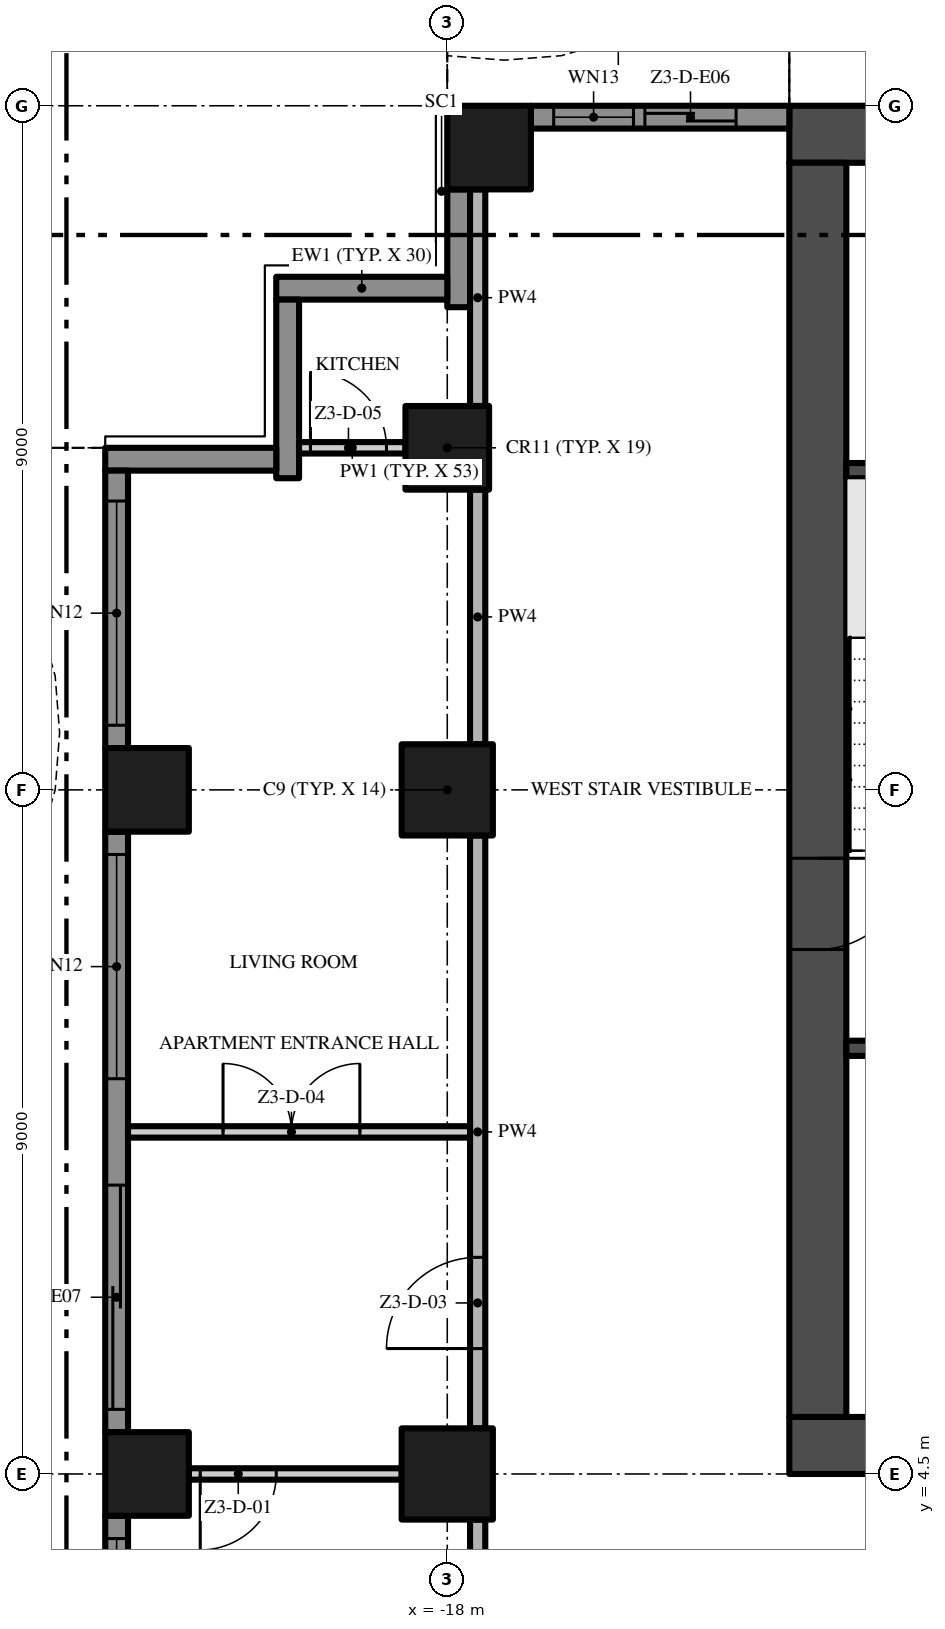
"""IFC4 building model, lengths in metres.
Left out: names, types, materials, properties, quantities, classifications, styles, units other than length and angle.
Written with IfcOpenShell. Run it as: python <this file> out.ifc"""

import sys

from ifc_helpers import new_model, si_unit, direction, frame, frame_2d, origin, origin_2d, place, context, subcontext, project, spatial, polyline, rectangle, outline, extrude, element, fill, save


model = new_model("IFC4")
c1 = context("Model", 3, precision=1e-05, world=origin(), true_north=direction((0.0, 1.0)))
c2 = subcontext(c1, "Body", "Model", "MODEL_VIEW")
j1 = project(units=[si_unit("LENGTHUNIT", "METRE"), si_unit("PLANEANGLEUNIT", "RADIAN")], contexts=[c1])
p1 = place(None, origin())
s1 = spatial("IfcSite", under=j1, at=p1, CompositionType="ELEMENT")
p2 = place(p1, origin())
s2 = spatial("IfcBuilding", under=s1, at=p2, CompositionType="ELEMENT")
p3 = place(p2, frame((0.0, 0.0, 159.2)))
s3 = spatial("IfcBuildingStorey", under=s2, at=p3, CompositionType="ELEMENT", Elevation=159.2)
p4 = place(p3, frame((-13.5, 4.875, -0.3), z_axis=(0.0, 0.0, 1.0), x_axis=(1.0, 0.0, 0.0)))
e1 = element("IfcWall", 1, at=p4, inside=s3, PredefinedType="SHEAR", context=c2, shape_type="SweptSolid", body=[
    extrude(rectangle(XDim=27.0, YDim=0.75, at=frame_2d((13.5, 0.0))), origin(), (0.0, 0.0, 1.0), 3.8),
])
p5 = place(p4, frame((12.0, 0.0, 0.3)))
e2 = element("IfcOpeningElement", 2, at=p5, cuts=e1, PredefinedType="OPENING", context=c2, shape_type="SweptSolid", body=[
    extrude(rectangle(XDim=3.0, YDim=2.4, at=frame_2d((1.5, 1.2))), frame((0.0, 0.385, 0.0), z_axis=(0.0, -1.0, 0.0), x_axis=(1.0, 0.0, 0.0)), (0.0, 0.0, 1.0), 0.77),
])
p6 = place(p4, frame((4.9, 0.0, 0.3)))
e3 = element("IfcOpeningElement", 3, at=p6, cuts=e1, PredefinedType="OPENING", context=c2, shape_type="SweptSolid", body=[
    extrude(rectangle(XDim=1.2, YDim=2.2, at=frame_2d((0.6, 1.1))), frame((0.0, 0.385, 0.0), z_axis=(0.0, -1.0, 0.0), x_axis=(1.0, 0.0, 0.0)), (0.0, 0.0, 1.0), 0.77),
])
p7 = place(p4, frame((20.75, 0.0, 0.3)))
e4 = element("IfcOpeningElement", 4, at=p7, cuts=e1, PredefinedType="OPENING", context=c2, shape_type="SweptSolid", body=[
    extrude(rectangle(XDim=1.5, YDim=2.2, at=frame_2d((0.75, 1.1))), frame((0.0, 0.385, 0.0), z_axis=(0.0, -1.0, 0.0), x_axis=(1.0, 0.0, 0.0)), (0.0, 0.0, 1.0), 0.77),
])
p8 = place(p4, frame((17.4, 0.0, 0.3)))
e5 = element("IfcOpeningElement", 5, at=p8, cuts=e1, PredefinedType="OPENING", context=c2, shape_type="SweptSolid", body=[
    extrude(rectangle(XDim=1.2, YDim=2.2, at=frame_2d((0.6, 1.1))), frame((0.0, 0.385, 0.0), z_axis=(0.0, -1.0, 0.0), x_axis=(1.0, 0.0, 0.0)), (0.0, 0.0, 1.0), 0.77),
])
p9 = place(p3, frame((13.5, 22.125, -0.3), z_axis=(0.0, 0.0, 1.0), x_axis=(-1.0, 0.0, 0.0)))
e6 = element("IfcWall", 6, at=p9, inside=s3, PredefinedType="SHEAR", context=c2, shape_type="SweptSolid", body=[
    extrude(rectangle(XDim=27.0, YDim=0.75, at=frame_2d((13.5, 0.0))), origin(), (0.0, 0.0, 1.0), 3.8),
])
p10 = place(p3, frame((-13.125, 21.75, -0.3), z_axis=(0.0, 0.0, 1.0), x_axis=(0.0, -1.0, 0.0)))
e7 = element("IfcWall", 7, at=p10, inside=s3, PredefinedType="SHEAR", context=c2, shape_type="SweptSolid", body=[
    extrude(rectangle(XDim=16.5, YDim=0.75, at=frame_2d((8.25, 0.0))), origin(), (0.0, 0.0, 1.0), 3.8),
])
p11 = place(p10, frame((9.15, 0.0, 0.3)))
e8 = element("IfcOpeningElement", 8, at=p11, cuts=e7, PredefinedType="OPENING", context=c2, shape_type="SweptSolid", body=[
    extrude(rectangle(XDim=1.2, YDim=2.2, at=frame_2d((0.6, 1.1))), frame((0.0, 0.385, 0.0), z_axis=(0.0, -1.0, 0.0), x_axis=(1.0, 0.0, 0.0)), (0.0, 0.0, 1.0), 0.77),
])
p12 = place(p3, frame((-18.0, 13.5, 0.0), z_axis=(0.0, 0.0, 1.0), x_axis=(1.0, 0.0, 0.0)))
e9 = element("IfcColumn", 9, at=p12, inside=s3, PredefinedType="COLUMN", context=c2, shape_type="SweptSolid", body=[
    extrude(rectangle(XDim=1.2, YDim=1.2, at=origin_2d()), origin(), (0.0, 0.0, 1.0), 3.5),
])
p13 = place(p3, frame((-17.45, 21.95, 0.0), z_axis=(0.0, 0.0, 1.0), x_axis=(1.0, 0.0, 0.0)))
e10 = element("IfcColumn", 10, at=p13, inside=s3, PredefinedType="COLUMN", context=c2, shape_type="SweptSolid", body=[
    extrude(rectangle(XDim=1.1, YDim=1.1, at=origin_2d()), origin(), (0.0, 0.0, 1.0), 3.5),
])
p14 = place(p3, frame((-18.0, 4.5, 0.0), z_axis=(0.0, 0.0, 1.0), x_axis=(1.0, 0.0, 0.0)))
e11 = element("IfcColumn", 11, at=p14, inside=s3, PredefinedType="COLUMN", context=c2, shape_type="SweptSolid", body=[
    extrude(rectangle(XDim=1.2, YDim=1.2, at=origin_2d()), origin(), (0.0, 0.0, 1.0), 3.5),
])
for number, where, z_axis, x_axis in (
    (12, (-21.95, 13.5, 0.0), (0.0, 0.0, 1.0), (1.0, 0.0, 0.0)),
    (13, (-18.0, 18.0, 0.0), (0.0, 0.0, 1.0), (1.0, 0.0, 0.0)),
    (14, (-21.95, 4.5, 0.0), (0.0, 0.0, 1.0), (1.0, 0.0, 0.0)),
):
    element("IfcColumn", number, at=place(p3, frame(where, z_axis=z_axis, x_axis=x_axis)), inside=s3, PredefinedType="COLUMN", context=c2, shape_type="SweptSolid", body=[
        extrude(rectangle(XDim=1.1, YDim=1.1, at=origin_2d()), origin(), (0.0, 0.0, 1.0), 3.5),
    ])
p15 = place(p3, frame((-16.9, 22.35, 0.0), z_axis=(0.0, 0.0, 1.0), x_axis=(1.0, 0.0, 0.0)))
e15 = element("IfcWall", 15, at=p15, inside=s3, PredefinedType="SOLIDWALL", context=c2, shape_type="SweptSolid", body=[
    extrude(rectangle(XDim=3.4, YDim=0.3, at=frame_2d((1.7, 0.0))), origin(), (0.0, 0.0, 1.0), 3.5),
])
p16 = place(p15, frame((1.5, 0.0, 0.0)))
e16 = element("IfcOpeningElement", 16, at=p16, cuts=e15, PredefinedType="OPENING", context=c2, shape_type="SweptSolid", body=[
    extrude(rectangle(XDim=1.2, YDim=2.4, at=frame_2d((0.6, 1.2))), frame((0.0, 0.16, 0.0), z_axis=(0.0, -1.0, 0.0), x_axis=(1.0, 0.0, 0.0)), (0.0, 0.0, 1.0), 0.32),
])
p17 = place(p15, frame((0.3, 0.0, 0.45)))
e17 = element("IfcOpeningElement", 17, at=p17, cuts=e15, PredefinedType="OPENING", context=c2, shape_type="SweptSolid", body=[
    extrude(rectangle(XDim=1.05, YDim=2.65, at=frame_2d((0.525, 1.325))), frame((0.0, 0.16, 0.0), z_axis=(0.0, -1.0, 0.0), x_axis=(1.0, 0.0, 0.0)), (0.0, 0.0, 1.0), 0.32),
])
p18 = place(p3, frame((-17.85, 19.85, 0.0), z_axis=(0.0, 0.0, 1.0), x_axis=(0.0, 1.0, 0.0)))
e18 = element("IfcWall", 18, at=p18, inside=s3, PredefinedType="SOLIDWALL", context=c2, shape_type="SweptSolid", body=[
    extrude(rectangle(XDim=1.55, YDim=0.3, at=frame_2d((0.775, 0.0))), origin(), (0.0, 0.0, 1.0), 3.5),
])
p19 = place(p3, frame((-20.25, 20.1, 0.0), z_axis=(0.0, 0.0, 1.0), x_axis=(1.0, 0.0, 0.0)))
e19 = element("IfcWall", 19, at=p19, inside=s3, PredefinedType="SOLIDWALL", context=c2, shape_type="SweptSolid", body=[
    extrude(rectangle(XDim=2.25, YDim=0.3, at=frame_2d((1.125, 0.0))), origin(), (0.0, 0.0, 1.0), 3.5),
])
p20 = place(p3, frame((-20.1, 17.6, 0.0), z_axis=(0.0, 0.0, 1.0), x_axis=(0.0, 1.0, 0.0)))
e20 = element("IfcWall", 20, at=p20, inside=s3, PredefinedType="SOLIDWALL", context=c2, shape_type="SweptSolid", body=[
    extrude(rectangle(XDim=2.35, YDim=0.3, at=frame_2d((1.175, 0.0))), origin(), (0.0, 0.0, 1.0), 3.5),
])
p21 = place(p3, frame((-22.5, 17.85, 0.0), z_axis=(0.0, 0.0, 1.0), x_axis=(1.0, 0.0, 0.0)))
e21 = element("IfcWall", 21, at=p21, inside=s3, PredefinedType="SOLIDWALL", context=c2, shape_type="SweptSolid", body=[
    extrude(rectangle(XDim=2.25, YDim=0.3, at=frame_2d((1.125, 0.0))), origin(), (0.0, 0.0, 1.0), 3.5),
])
p22 = place(p3, frame((-22.35, 14.05, 0.0), z_axis=(0.0, 0.0, 1.0), x_axis=(0.0, 1.0, 0.0)))
e22 = element("IfcWall", 22, at=p22, inside=s3, PredefinedType="SOLIDWALL", context=c2, shape_type="SweptSolid", body=[
    extrude(rectangle(XDim=3.65, YDim=0.3, at=frame_2d((1.825, 0.0))), origin(), (0.0, 0.0, 1.0), 3.5),
])
p23 = place(p22, frame((0.3, 0.0, 0.45)))
e23 = element("IfcOpeningElement", 23, at=p23, cuts=e22, PredefinedType="OPENING", context=c2, shape_type="SweptSolid", body=[
    extrude(rectangle(XDim=2.95, YDim=2.65, at=frame_2d((1.475, 1.325))), frame((0.0, 0.16, 0.0), z_axis=(0.0, -1.0, 0.0), x_axis=(1.0, 0.0, 0.0)), (0.0, 0.0, 1.0), 0.32),
])
p24 = place(p3, frame((-22.35, 5.05, 0.0), z_axis=(0.0, 0.0, 1.0), x_axis=(0.0, 1.0, 0.0)))
e24 = element("IfcWall", 24, at=p24, inside=s3, PredefinedType="SOLIDWALL", context=c2, shape_type="SweptSolid", body=[
    extrude(rectangle(XDim=7.9, YDim=0.3, at=frame_2d((3.95, 0.0))), origin(), (0.0, 0.0, 1.0), 3.5),
])
p25 = place(p24, frame((4.65, 0.0, 0.45)))
e25 = element("IfcOpeningElement", 25, at=p25, cuts=e24, PredefinedType="OPENING", context=c2, shape_type="SweptSolid", body=[
    extrude(rectangle(XDim=2.95, YDim=2.65, at=frame_2d((1.475, 1.325))), frame((0.0, 0.16, 0.0), z_axis=(0.0, -1.0, 0.0), x_axis=(1.0, 0.0, 0.0)), (0.0, 0.0, 1.0), 0.32),
])
p26 = place(p24, frame((0.3, 0.0, 0.0)))
e26 = element("IfcOpeningElement", 26, at=p26, cuts=e24, PredefinedType="OPENING", context=c2, shape_type="SweptSolid", body=[
    extrude(rectangle(XDim=2.95, YDim=2.4, at=frame_2d((1.475, 1.2))), frame((0.0, 0.16, 0.0), z_axis=(0.0, -1.0, 0.0), x_axis=(1.0, 0.0, 0.0)), (0.0, 0.0, 1.0), 0.32),
])
p27 = place(p3, frame((-22.35, -3.95, 0.0), z_axis=(0.0, 0.0, 1.0), x_axis=(0.0, 1.0, 0.0)))
e27 = element("IfcWall", 27, at=p27, inside=s3, PredefinedType="SOLIDWALL", context=c2, shape_type="SweptSolid", body=[
    extrude(rectangle(XDim=7.9, YDim=0.3, at=frame_2d((3.95, 0.0))), origin(), (0.0, 0.0, 1.0), 3.5),
])
p28 = place(p27, frame((4.65, 0.0, 0.45)))
e28 = element("IfcOpeningElement", 28, at=p28, cuts=e27, PredefinedType="OPENING", context=c2, shape_type="SweptSolid", body=[
    extrude(rectangle(XDim=2.95, YDim=2.65, at=frame_2d((1.475, 1.325))), frame((0.0, 0.16, 0.0), z_axis=(0.0, -1.0, 0.0), x_axis=(1.0, 0.0, 0.0)), (0.0, 0.0, 1.0), 0.32),
])
p29 = place(p27, frame((0.3, 0.0, 0.45)))
e29 = element("IfcOpeningElement", 29, at=p29, cuts=e27, PredefinedType="OPENING", context=c2, shape_type="SweptSolid", body=[
    extrude(rectangle(XDim=2.95, YDim=2.65, at=frame_2d((1.475, 1.325))), frame((0.0, 0.16, 0.0), z_axis=(0.0, -1.0, 0.0), x_axis=(1.0, 0.0, 0.0)), (0.0, 0.0, 1.0), 0.32),
])
p30 = place(p3, origin())
e30 = element("IfcWall", 30, at=p30, inside=s3, PredefinedType="USERDEFINED", context=c2, shape_type="SweptSolid", body=[
    extrude(outline(polyline([(-13.5, 24.3), (-15.0, 23.595), (-16.5, 23.159), (-17.25, 23.1), (-18.0, 23.159), (-18.02, 22.909), (-17.25, 22.849), (-16.455, 22.911), (-14.911, 23.36), (-13.394, 24.074), (-13.5, 24.3)])), origin(), (0.0, 0.0, 1.0), 0.9),
])
p31 = place(p3, origin())
e31 = element("IfcWall", 31, at=p31, inside=s3, PredefinedType="USERDEFINED", context=c2, shape_type="SweptSolid", body=[
    extrude(outline(polyline([(-24.3, 18.0), (-23.595, 16.5), (-23.159, 15.0), (-23.1, 14.25), (-23.159, 13.5), (-23.595, 12.0), (-24.3, 10.5), (-25.005, 9.0), (-25.441, 7.5), (-25.5, 6.75), (-25.441, 6.0), (-25.005, 4.5), (-24.3, 3.0), (-23.595, 1.5), (-23.159, 0.0), (-23.1, -0.75), (-23.159, -1.5), (-23.595, -3.0), (-24.3, -4.5), (-25.005, -6.0), (-25.441, -7.5), (-25.5, -8.25), (-25.441, -9.0), (-25.005, -10.5), (-24.3, -12.0), (-23.595, -13.5), (-23.368, -13.394), (-24.074, -11.894), (-24.771, -10.411), (-25.194, -8.955), (-25.249, -8.25), (-25.194, -7.545), (-24.771, -6.089), (-24.074, -4.606), (-23.36, -3.089), (-22.911, -1.545), (-22.849, -0.75), (-22.911, 0.045), (-23.36, 1.589), (-24.074, 3.106), (-24.771, 4.589), (-25.194, 6.045), (-25.249, 6.75), (-25.194, 7.455), (-24.771, 8.911), (-24.074, 10.394), (-23.36, 11.911), (-22.911, 13.455), (-22.849, 14.25), (-22.911, 15.045), (-23.36, 16.589), (-24.074, 18.106), (-24.3, 18.0)])), origin(), (0.0, 0.0, 1.0), 0.9),
])
for number, where, z_axis, x_axis in (
    (32, (-12.75, 10.1, 0.0), (0.0, 0.0, 1.0), (1.0, 0.0, 0.0)),
    (33, (-12.75, 17.7, 0.0), (0.0, 0.0, 1.0), (1.0, 0.0, 0.0)),
):
    element("IfcWall", number, at=place(p3, frame(where, z_axis=z_axis, x_axis=x_axis)), inside=s3, PredefinedType="SHEAR", context=c2, shape_type="SweptSolid", body=[
        extrude(rectangle(XDim=3.1, YDim=0.2, at=frame_2d((1.55, 0.0))), origin(), (0.0, 0.0, 1.0), 3.5),
    ])
p32 = place(p3, frame((-18.6, 4.5, 0.0), z_axis=(0.0, 0.0, 1.0), x_axis=(-1.0, 0.0, 0.0)))
e34 = element("IfcWall", 34, at=p32, inside=s3, PredefinedType="PARTITIONING", context=c2, shape_type="SweptSolid", body=[
    extrude(rectangle(XDim=2.8, YDim=0.15, at=frame_2d((1.4, 0.0))), origin(), (0.0, 0.0, 1.0), 3.5),
])
p33 = place(p32, frame((1.65, 0.0, 0.0)))
e35 = element("IfcOpeningElement", 35, at=p33, cuts=e34, PredefinedType="OPENING", context=c2, shape_type="SweptSolid", body=[
    extrude(rectangle(XDim=1.0, YDim=2.4, at=frame_2d((0.5, 1.2))), frame((0.0, 0.085, 0.0), z_axis=(0.0, -1.0, 0.0), x_axis=(1.0, 0.0, 0.0)), (0.0, 0.0, 1.0), 0.17),
])
p34 = place(p3, frame((-22.2, 9.0, 0.0), z_axis=(0.0, 0.0, 1.0), x_axis=(1.0, 0.0, 0.0)))
e36 = element("IfcWall", 36, at=p34, inside=s3, PredefinedType="PARTITIONING", context=c2, shape_type="SweptSolid", body=[
    extrude(rectangle(XDim=4.5, YDim=0.15, at=frame_2d((2.25, 0.0))), origin(), (0.0, 0.0, 1.0), 3.5),
])
p35 = place(p34, frame((1.25, 0.0, 0.0)))
e37 = element("IfcOpeningElement", 37, at=p35, cuts=e36, PredefinedType="OPENING", context=c2, shape_type="SweptSolid", body=[
    extrude(rectangle(XDim=1.8, YDim=2.4, at=frame_2d((0.9, 1.2))), frame((0.0, 0.085, 0.0), z_axis=(0.0, -1.0, 0.0), x_axis=(1.0, 0.0, 0.0)), (0.0, 0.0, 1.0), 0.17),
])
p36 = place(p3, frame((-19.95, 18.0, 0.0), z_axis=(0.0, 0.0, 1.0), x_axis=(1.0, 0.0, 0.0)))
e38 = element("IfcWall", 38, at=p36, inside=s3, PredefinedType="PARTITIONING", context=c2, shape_type="SweptSolid", body=[
    extrude(rectangle(XDim=1.4, YDim=0.15, at=frame_2d((0.7, 0.0))), origin(), (0.0, 0.0, 1.0), 3.5),
])
p37 = place(p36, frame((0.15, 0.0, 0.0)))
e39 = element("IfcOpeningElement", 39, at=p37, cuts=e38, PredefinedType="OPENING", context=c2, shape_type="SweptSolid", body=[
    extrude(rectangle(XDim=1.0, YDim=2.4, at=frame_2d((0.5, 1.2))), frame((0.0, 0.085, 0.0), z_axis=(0.0, -1.0, 0.0), x_axis=(1.0, 0.0, 0.0)), (0.0, 0.0, 1.0), 0.17),
])
p38 = place(p3, frame((-17.6, -0.2, 0.0), z_axis=(0.0, 0.0, 1.0), x_axis=(0.0, 1.0, 0.0)))
e40 = element("IfcWall", 40, at=p38, inside=s3, PredefinedType="PARTITIONING", context=c2, shape_type="SweptSolid", body=[
    extrude(rectangle(XDim=4.1, YDim=0.2, at=frame_2d((2.05, 0.0))), origin(), (0.0, 0.0, 1.0), 3.5),
])
p39 = place(p3, frame((-17.6, 5.1, 0.0), z_axis=(0.0, 0.0, 1.0), x_axis=(0.0, 1.0, 0.0)))
e41 = element("IfcWall", 41, at=p39, inside=s3, PredefinedType="PARTITIONING", context=c2, shape_type="SweptSolid", body=[
    extrude(rectangle(XDim=7.8, YDim=0.2, at=frame_2d((3.9, 0.0))), origin(), (0.0, 0.0, 1.0), 3.5),
])
p40 = place(p39, frame((1.05, 0.0, 0.0)))
e42 = element("IfcOpeningElement", 42, at=p40, cuts=e41, PredefinedType="OPENING", context=c2, shape_type="SweptSolid", body=[
    extrude(rectangle(XDim=1.2, YDim=2.4, at=frame_2d((0.6, 1.2))), frame((0.0, 0.11, 0.0), z_axis=(0.0, -1.0, 0.0), x_axis=(1.0, 0.0, 0.0)), (0.0, 0.0, 1.0), 0.22),
])
p41 = place(p3, frame((-17.6, 14.1, 0.0), z_axis=(0.0, 0.0, 1.0), x_axis=(0.0, 1.0, 0.0)))
e43 = element("IfcWall", 43, at=p41, inside=s3, PredefinedType="PARTITIONING", context=c2, shape_type="SweptSolid", body=[
    extrude(rectangle(XDim=3.35, YDim=0.2, at=frame_2d((1.675, 0.0))), origin(), (0.0, 0.0, 1.0), 3.5),
])
p42 = place(p3, frame((-17.6, 18.55, 0.0), z_axis=(0.0, 0.0, 1.0), x_axis=(0.0, 1.0, 0.0)))
e44 = element("IfcWall", 44, at=p42, inside=s3, PredefinedType="PARTITIONING", context=c2, shape_type="SweptSolid", body=[
    extrude(rectangle(XDim=2.85, YDim=0.2, at=frame_2d((1.425, 0.0))), origin(), (0.0, 0.0, 1.0), 3.5),
])
p43 = place(p16, origin())
e45 = element("IfcDoor", 45, at=p43, inside=s3, OperationType="SINGLE_SWING_LEFT", PredefinedType="DOOR", context=c2, shape_type="SweptSolid", body=[
    extrude(rectangle(XDim=1.2, YDim=2.4, at=frame_2d((0.6, 1.2))), frame((0.0, 0.025, 0.0), z_axis=(0.0, -1.0, 0.0), x_axis=(1.0, 0.0, 0.0)), (0.0, 0.0, 1.0), 0.05),
])
fill(e16, e45)
p44 = place(p17, origin())
e46 = element("IfcWindow", 46, at=p44, inside=s3, PartitioningType="SINGLE_PANEL", PredefinedType="WINDOW", context=c2, shape_type="SweptSolid", body=[
    extrude(rectangle(XDim=1.05, YDim=2.65, at=frame_2d((0.525, 1.325))), frame((0.0, 0.03, 0.0), z_axis=(0.0, -1.0, 0.0), x_axis=(1.0, 0.0, 0.0)), (0.0, 0.0, 1.0), 0.06),
])
fill(e17, e46)
p45 = place(p23, origin())
e47 = element("IfcWindow", 47, at=p45, inside=s3, PartitioningType="SINGLE_PANEL", PredefinedType="WINDOW", context=c2, shape_type="SweptSolid", body=[
    extrude(rectangle(XDim=2.95, YDim=2.65, at=frame_2d((1.475, 1.325))), frame((0.0, 0.03, 0.0), z_axis=(0.0, -1.0, 0.0), x_axis=(1.0, 0.0, 0.0)), (0.0, 0.0, 1.0), 0.06),
])
fill(e23, e47)
p46 = place(p25, origin())
e48 = element("IfcWindow", 48, at=p46, inside=s3, PartitioningType="SINGLE_PANEL", PredefinedType="WINDOW", context=c2, shape_type="SweptSolid", body=[
    extrude(rectangle(XDim=2.95, YDim=2.65, at=frame_2d((1.475, 1.325))), frame((0.0, 0.03, 0.0), z_axis=(0.0, -1.0, 0.0), x_axis=(1.0, 0.0, 0.0)), (0.0, 0.0, 1.0), 0.06),
])
fill(e25, e48)
p47 = place(p26, origin())
e49 = element("IfcDoor", 49, at=p47, inside=s3, OperationType="SINGLE_SWING_LEFT", PredefinedType="DOOR", context=c2, shape_type="SweptSolid", body=[
    extrude(rectangle(XDim=2.95, YDim=2.4, at=frame_2d((1.475, 1.2))), frame((0.0, 0.025, 0.0), z_axis=(0.0, -1.0, 0.0), x_axis=(1.0, 0.0, 0.0)), (0.0, 0.0, 1.0), 0.05),
])
fill(e26, e49)
p48 = place(p28, origin())
e50 = element("IfcWindow", 50, at=p48, inside=s3, PartitioningType="SINGLE_PANEL", PredefinedType="WINDOW", context=c2, shape_type="SweptSolid", body=[
    extrude(rectangle(XDim=2.95, YDim=2.65, at=frame_2d((1.475, 1.325))), frame((0.0, 0.03, 0.0), z_axis=(0.0, -1.0, 0.0), x_axis=(1.0, 0.0, 0.0)), (0.0, 0.0, 1.0), 0.06),
])
fill(e28, e50)
p49 = place(p11, frame((1.2, 0.0, 0.0), z_axis=(0.0, 0.0, 1.0), x_axis=(-1.0, 0.0, 0.0)))
e51 = element("IfcDoor", 51, at=p49, inside=s3, OperationType="SINGLE_SWING_RIGHT", PredefinedType="DOOR", context=c2, shape_type="SweptSolid", body=[
    extrude(rectangle(XDim=1.2, YDim=2.2, at=frame_2d((0.6, 1.1))), frame((0.0, 0.025, 0.0), z_axis=(0.0, -1.0, 0.0), x_axis=(1.0, 0.0, 0.0)), (0.0, 0.0, 1.0), 0.05),
])
fill(e8, e51)
p50 = place(p33, origin())
e52 = element("IfcDoor", 52, at=p50, inside=s3, OperationType="SINGLE_SWING_RIGHT", PredefinedType="DOOR", context=c2, shape_type="SweptSolid", body=[
    extrude(rectangle(XDim=1.0, YDim=2.4, at=frame_2d((0.5, 1.2))), frame((0.0, 0.025, 0.0), z_axis=(0.0, -1.0, 0.0), x_axis=(1.0, 0.0, 0.0)), (0.0, 0.0, 1.0), 0.05),
])
fill(e35, e52)
p51 = place(p40, origin())
e53 = element("IfcDoor", 53, at=p51, inside=s3, OperationType="SINGLE_SWING_LEFT", PredefinedType="DOOR", context=c2, shape_type="SweptSolid", body=[
    extrude(rectangle(XDim=1.2, YDim=2.4, at=frame_2d((0.6, 1.2))), frame((0.0, 0.025, 0.0), z_axis=(0.0, -1.0, 0.0), x_axis=(1.0, 0.0, 0.0)), (0.0, 0.0, 1.0), 0.05),
])
fill(e42, e53)
p52 = place(p35, origin())
e54 = element("IfcDoor", 54, at=p52, inside=s3, OperationType="DOUBLE_DOOR_SINGLE_SWING", PredefinedType="DOOR", context=c2, shape_type="SweptSolid", body=[
    extrude(rectangle(XDim=1.8, YDim=2.4, at=frame_2d((0.9, 1.2))), frame((0.0, 0.025, 0.0), z_axis=(0.0, -1.0, 0.0), x_axis=(1.0, 0.0, 0.0)), (0.0, 0.0, 1.0), 0.05),
])
fill(e37, e54)
p53 = place(p37, origin())
e55 = element("IfcDoor", 55, at=p53, inside=s3, OperationType="SINGLE_SWING_LEFT", PredefinedType="DOOR", context=c2, shape_type="SweptSolid", body=[
    extrude(rectangle(XDim=1.0, YDim=2.4, at=frame_2d((0.5, 1.2))), frame((0.0, 0.025, 0.0), z_axis=(0.0, -1.0, 0.0), x_axis=(1.0, 0.0, 0.0)), (0.0, 0.0, 1.0), 0.05),
])
fill(e39, e55)
save(model, sys.argv[1])
